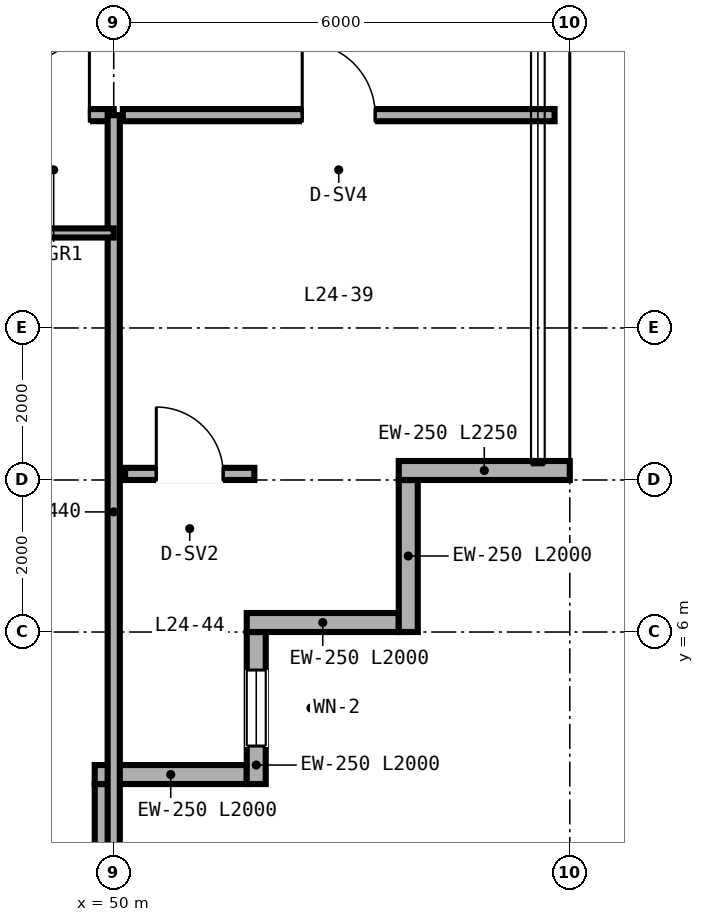
"""IFC4 building model, lengths in metres.
Left out: names, types, materials, properties, quantities, classifications, styles, units other than length and angle.
Written with IfcOpenShell. Run it as: python <this file> out.ifc"""

import sys

from ifc_helpers import new_model, si_unit, direction, frame, frame_2d, origin, place, context, subcontext, project, spatial, rectangle, extrude, source, transform, mapped, element, fill, save


model = new_model("IFC4")
c1 = context("Model", 3, precision=1e-05, world=origin(), true_north=direction((0.0, 1.0)))
c2 = subcontext(c1, "Body", "Model", "MODEL_VIEW")
j1 = project(units=[si_unit("LENGTHUNIT", "METRE"), si_unit("PLANEANGLEUNIT", "RADIAN")], contexts=[c1])
p1 = place(None, origin())
s1 = spatial("IfcSite", under=j1, at=p1, CompositionType="ELEMENT")
p2 = place(p1, origin())
s2 = spatial("IfcBuilding", under=s1, at=p2, CompositionType="ELEMENT")
p3 = place(p2, frame((0.0, 0.0, 100.8)))
s3 = spatial("IfcBuildingStorey", under=s2, at=p3, CompositionType="ELEMENT", Elevation=100.8)
p4 = place(p3, frame((49.875, 2.0, 0.0), z_axis=(0.0, 0.0, 1.0), x_axis=(0.0, 1.0, 0.0)))
e1 = element("IfcWall", 1, at=p4, inside=s3, PredefinedType="SOLIDWALL", context=c2, shape_type="SweptSolid", body=[
    extrude(rectangle(XDim=2.0, YDim=0.25, at=frame_2d((1.0, 0.0))), origin(), (0.0, 0.0, 1.0), 2.667),
])
p5 = place(p3, frame((49.75, 4.125, 0.0), z_axis=(0.0, 0.0, 1.0), x_axis=(1.0, 0.0, 0.0)))
e2 = element("IfcWall", 2, at=p5, inside=s3, PredefinedType="SOLIDWALL", context=c2, shape_type="SweptSolid", body=[
    extrude(rectangle(XDim=2.0, YDim=0.25, at=frame_2d((1.0, 0.0))), origin(), (0.0, 0.0, 1.0), 3.36),
])
p6 = place(p3, frame((51.875, 4.0, 0.0), z_axis=(0.0, 0.0, 1.0), x_axis=(0.0, 1.0, 0.0)))
e3 = element("IfcWall", 3, at=p6, inside=s3, PredefinedType="SOLIDWALL", context=c2, shape_type="SweptSolid", body=[
    extrude(rectangle(XDim=2.0, YDim=0.25, at=frame_2d((1.0, 0.0))), origin(), (0.0, 0.0, 1.0), 3.36),
])
p7 = place(p6, frame((0.5, 0.0, 0.85)))
e4 = element("IfcOpeningElement", 4, at=p7, cuts=e3, PredefinedType="OPENING", context=c2, shape_type="SweptSolid", body=[
    extrude(rectangle(XDim=1.0, YDim=1.9, at=frame_2d((0.5, 0.95))), frame((0.0, 0.135, 0.0), z_axis=(0.0, -1.0, 0.0), x_axis=(1.0, 0.0, 0.0)), (0.0, 0.0, 1.0), 0.27),
])
for number, where, z_axis, x_axis in (
    (5, (51.75, 6.125, 0.0), (0.0, 0.0, 1.0), (1.0, 0.0, 0.0)),
    (6, (53.875, 6.0, 0.0), (0.0, 0.0, 1.0), (0.0, 1.0, 0.0)),
):
    element("IfcWall", number, at=place(p3, frame(where, z_axis=z_axis, x_axis=x_axis)), inside=s3, PredefinedType="SOLIDWALL", context=c2, shape_type="SweptSolid", body=[
        extrude(rectangle(XDim=2.0, YDim=0.25, at=frame_2d((1.0, 0.0))), origin(), (0.0, 0.0, 1.0), 3.36),
    ])
p8 = place(p3, frame((53.75, 8.125, 0.0), z_axis=(0.0, 0.0, 1.0), x_axis=(1.0, 0.0, 0.0)))
e7 = element("IfcWall", 7, at=p8, inside=s3, PredefinedType="SOLIDWALL", context=c2, shape_type="SweptSolid", body=[
    extrude(rectangle(XDim=2.25, YDim=0.25, at=frame_2d((1.125, 0.0))), origin(), (0.0, 0.0, 1.0), 3.36),
])
p9 = place(p3, frame((50.12, 12.8, 0.0), z_axis=(0.0, 0.0, 1.0), x_axis=(1.0, 0.0, 0.0)))
e8 = element("IfcWall", 8, at=p9, inside=s3, PredefinedType="PARTITIONING", context=c2, shape_type="SweptSolid", body=[
    extrude(rectangle(XDim=5.68, YDim=0.16, at=frame_2d((2.84, 0.0))), origin(), (0.0, 0.0, 1.0), 3.36),
])
p10 = place(p9, frame((2.36, 0.0, 0.0)))
e9 = element("IfcOpeningElement", 9, at=p10, cuts=e8, PredefinedType="OPENING", context=c2, shape_type="SweptSolid", body=[
    extrude(rectangle(XDim=0.96, YDim=2.15, at=frame_2d((0.48, 1.075))), frame((0.0, 0.09, 0.0), z_axis=(0.0, -1.0, 0.0), x_axis=(1.0, 0.0, 0.0)), (0.0, 0.0, 1.0), 0.18),
])
p11 = place(p3, frame((50.15, 8.08, 0.0), z_axis=(0.0, 0.0, 1.0), x_axis=(1.0, 0.0, 0.0)))
e10 = element("IfcWall", 10, at=p11, inside=s3, PredefinedType="PARTITIONING", context=c2, shape_type="SweptSolid", body=[
    extrude(rectangle(XDim=1.7, YDim=0.16, at=frame_2d((0.85, 0.0))), origin(), (0.0, 0.0, 1.0), 3.36),
])
p12 = place(p11, frame((0.41, 0.0, 0.0)))
e11 = element("IfcOpeningElement", 11, at=p12, cuts=e10, PredefinedType="OPENING", context=c2, shape_type="SweptSolid", body=[
    extrude(rectangle(XDim=0.88, YDim=2.15, at=frame_2d((0.44, 1.075))), frame((0.0, 0.09, 0.0), z_axis=(0.0, -1.0, 0.0), x_axis=(1.0, 0.0, 0.0)), (0.0, 0.0, 1.0), 0.18),
])
p13 = place(p3, frame((14.0, 12.8, 0.0), z_axis=(0.0, 0.0, 1.0), x_axis=(1.0, 0.0, 0.0)))
e12 = element("IfcWall", 12, at=p13, inside=s3, PredefinedType="PARTITIONING", context=c2, shape_type="SweptSolid", body=[
    extrude(rectangle(XDim=36.0, YDim=0.16, at=frame_2d((18.0, 0.0))), origin(), (0.0, 0.0, 1.0), 2.581),
])
p14 = place(p13, frame((3.14, 0.0, 0.0)))
e13 = element("IfcOpeningElement", 13, at=p14, cuts=e12, PredefinedType="OPENING", context=c2, shape_type="SweptSolid", body=[
    extrude(rectangle(XDim=0.94, YDim=2.15, at=frame_2d((0.47, 1.075))), frame((0.0, 0.09, 0.0), z_axis=(0.0, -1.0, 0.0), x_axis=(1.0, 0.0, 0.0)), (0.0, 0.0, 1.0), 0.18),
])
p15 = place(p13, frame((7.54, 0.0, 0.0)))
e14 = element("IfcOpeningElement", 14, at=p15, cuts=e12, PredefinedType="OPENING", context=c2, shape_type="SweptSolid", body=[
    extrude(rectangle(XDim=0.94, YDim=2.15, at=frame_2d((0.47, 1.075))), frame((0.0, 0.09, 0.0), z_axis=(0.0, -1.0, 0.0), x_axis=(1.0, 0.0, 0.0)), (0.0, 0.0, 1.0), 0.18),
])
p16 = place(p13, frame((12.14, 0.0, 0.0)))
e15 = element("IfcOpeningElement", 15, at=p16, cuts=e12, PredefinedType="OPENING", context=c2, shape_type="SweptSolid", body=[
    extrude(rectangle(XDim=0.94, YDim=2.15, at=frame_2d((0.47, 1.075))), frame((0.0, 0.09, 0.0), z_axis=(0.0, -1.0, 0.0), x_axis=(1.0, 0.0, 0.0)), (0.0, 0.0, 1.0), 0.18),
])
p17 = place(p13, frame((16.94, 0.0, 0.0)))
e16 = element("IfcOpeningElement", 16, at=p17, cuts=e12, PredefinedType="OPENING", context=c2, shape_type="SweptSolid", body=[
    extrude(rectangle(XDim=0.94, YDim=2.15, at=frame_2d((0.47, 1.075))), frame((0.0, 0.09, 0.0), z_axis=(0.0, -1.0, 0.0), x_axis=(1.0, 0.0, 0.0)), (0.0, 0.0, 1.0), 0.18),
])
p18 = place(p13, frame((21.74, 0.0, 0.0)))
e17 = element("IfcOpeningElement", 17, at=p18, cuts=e12, PredefinedType="OPENING", context=c2, shape_type="SweptSolid", body=[
    extrude(rectangle(XDim=0.94, YDim=2.15, at=frame_2d((0.47, 1.075))), frame((0.0, 0.09, 0.0), z_axis=(0.0, -1.0, 0.0), x_axis=(1.0, 0.0, 0.0)), (0.0, 0.0, 1.0), 0.18),
])
p19 = place(p13, frame((26.34, 0.0, 0.0)))
e18 = element("IfcOpeningElement", 18, at=p19, cuts=e12, PredefinedType="OPENING", context=c2, shape_type="SweptSolid", body=[
    extrude(rectangle(XDim=0.94, YDim=2.15, at=frame_2d((0.47, 1.075))), frame((0.0, 0.09, 0.0), z_axis=(0.0, -1.0, 0.0), x_axis=(1.0, 0.0, 0.0)), (0.0, 0.0, 1.0), 0.18),
])
p20 = place(p13, frame((30.54, 0.0, 0.0)))
e19 = element("IfcOpeningElement", 19, at=p20, cuts=e12, PredefinedType="OPENING", context=c2, shape_type="SweptSolid", body=[
    extrude(rectangle(XDim=0.94, YDim=2.15, at=frame_2d((0.47, 1.075))), frame((0.0, 0.09, 0.0), z_axis=(0.0, -1.0, 0.0), x_axis=(1.0, 0.0, 0.0)), (0.0, 0.0, 1.0), 0.18),
])
p21 = place(p13, frame((34.74, 0.0, 0.0)))
e20 = element("IfcOpeningElement", 20, at=p21, cuts=e12, PredefinedType="OPENING", context=c2, shape_type="SweptSolid", body=[
    extrude(rectangle(XDim=0.94, YDim=2.15, at=frame_2d((0.47, 1.075))), frame((0.0, 0.09, 0.0), z_axis=(0.0, -1.0, 0.0), x_axis=(1.0, 0.0, 0.0)), (0.0, 0.0, 1.0), 0.18),
])
p22 = place(p3, frame((50.0, 2.36, 0.0), z_axis=(0.0, 0.0, 1.0), x_axis=(0.0, 1.0, 0.0)))
e21 = element("IfcWall", 21, at=p22, inside=s3, PredefinedType="PARTITIONING", context=c2, shape_type="SweptSolid", body=[
    extrude(rectangle(XDim=10.44, YDim=0.16, at=frame_2d((5.22, 0.0))), origin(), (0.0, 0.0, 1.0), 2.667),
])
p23 = place(p3, frame((48.9, 11.25, 0.0), z_axis=(0.0, 0.0, 1.0), x_axis=(1.0, 0.0, 0.0)))
e22 = element("IfcWall", 22, at=p23, inside=s3, PredefinedType="PARTITIONING", context=c2, shape_type="SweptSolid", body=[
    extrude(rectangle(XDim=1.1, YDim=0.12, at=frame_2d((0.55, 0.0))), origin(), (0.0, 0.0, 1.0), 3.36),
])
m1 = source(origin(), c2, "Body", "SweptSolid", [
    extrude(rectangle(XDim=1.0, YDim=1.9, at=frame_2d((0.5, 0.95))), frame((0.0, 0.03, 0.0), z_axis=(0.0, -1.0, 0.0), x_axis=(1.0, 0.0, 0.0)), (0.0, 0.0, 1.0), 0.06),
])
p24 = place(p7, origin())
e23 = element("IfcWindow", 23, at=p24, inside=s3, PartitioningType="SINGLE_PANEL", PredefinedType="WINDOW", context=c2, shape_type="MappedRepresentation", body=[
    mapped(m1, transform((0.0, 0.0, 0.0), scale=1.0)),
])
fill(e4, e23)
m2 = source(origin(), c2, "Body", "SweptSolid", [
    extrude(rectangle(XDim=0.96, YDim=2.15, at=frame_2d((0.48, 1.075))), frame((0.0, 0.025, 0.0), z_axis=(0.0, -1.0, 0.0), x_axis=(1.0, 0.0, 0.0)), (0.0, 0.0, 1.0), 0.05),
])
p25 = place(p10, origin())
e24 = element("IfcDoor", 24, at=p25, inside=s3, OperationType="SINGLE_SWING_LEFT", PredefinedType="DOOR", context=c2, shape_type="MappedRepresentation", body=[
    mapped(m2, transform((0.0, 0.0, 0.0), scale=1.0)),
])
fill(e9, e24)
m3 = source(origin(), c2, "Body", "SweptSolid", [
    extrude(rectangle(XDim=0.88, YDim=2.15, at=frame_2d((0.44, 1.075))), frame((0.0, 0.025, 0.0), z_axis=(0.0, -1.0, 0.0), x_axis=(1.0, 0.0, 0.0)), (0.0, 0.0, 1.0), 0.05),
])
p26 = place(p12, origin())
e25 = element("IfcDoor", 25, at=p26, inside=s3, OperationType="SINGLE_SWING_LEFT", PredefinedType="DOOR", context=c2, shape_type="MappedRepresentation", body=[
    mapped(m3, transform((0.0, 0.0, 0.0), scale=1.0)),
])
fill(e11, e25)
m4 = source(origin(), c2, "Body", "SweptSolid", [
    extrude(rectangle(XDim=0.94, YDim=2.15, at=frame_2d((0.47, 1.075))), frame((0.0, 0.025, 0.0), z_axis=(0.0, -1.0, 0.0), x_axis=(1.0, 0.0, 0.0)), (0.0, 0.0, 1.0), 0.05),
])
p27 = place(p21, origin())
e26 = element("IfcDoor", 26, at=p27, inside=s3, OperationType="SINGLE_SWING_RIGHT", PredefinedType="DOOR", context=c2, shape_type="MappedRepresentation", body=[
    mapped(m4, transform((0.0, 0.0, 0.0), scale=1.0)),
])
fill(e20, e26)
save(model, sys.argv[1])
